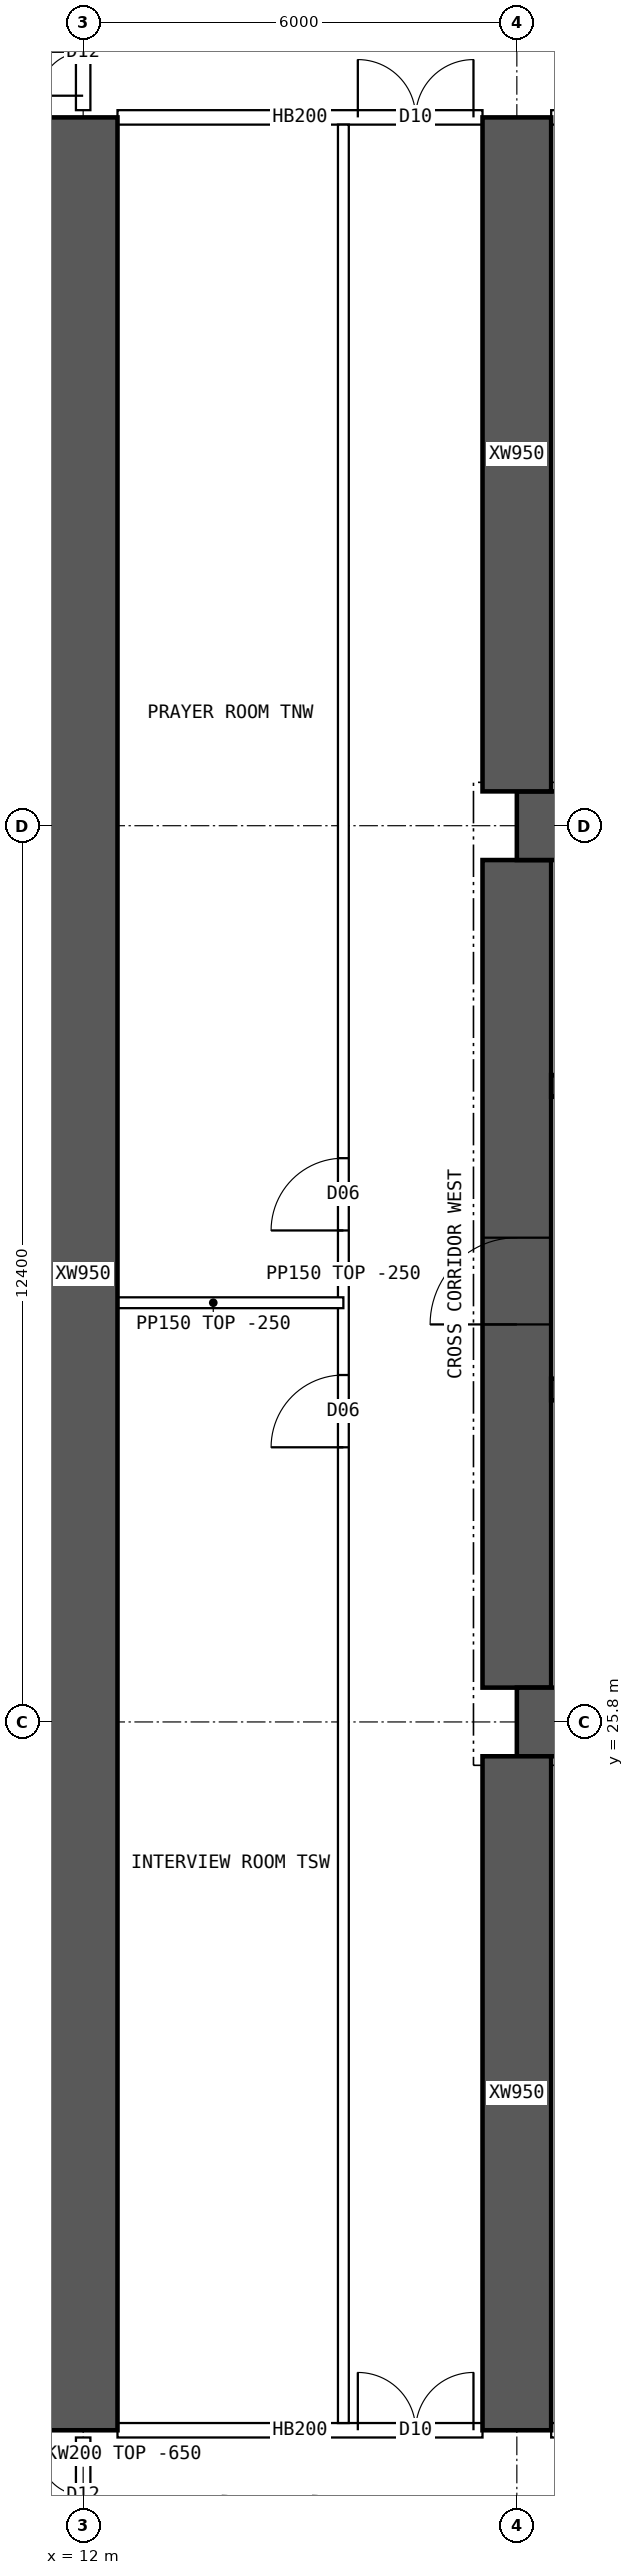
"""IFC4 building model, lengths in metres.
Left out: names, types, materials, properties, quantities, classifications, styles, units other than length and angle.
Written with IfcOpenShell. Run it as: python <this file> out.ifc"""

import sys

from ifc_helpers import new_model, si_unit, direction, frame, frame_2d, origin, place, context, subcontext, project, spatial, polyline, rectangle, outline, extrude, element, fill, save


model = new_model("IFC4")
c1 = context("Model", 3, precision=1e-05, world=origin(), true_north=direction((0.0, 1.0)))
c2 = subcontext(c1, "Body", "Model", "MODEL_VIEW")
j1 = project(units=[si_unit("LENGTHUNIT", "METRE"), si_unit("PLANEANGLEUNIT", "RADIAN")], contexts=[c1])
p1 = place(None, origin())
s1 = spatial("IfcSite", under=j1, at=p1, CompositionType="ELEMENT")
p2 = place(p1, origin())
s2 = spatial("IfcBuilding", under=s1, at=p2, CompositionType="ELEMENT")
p3 = place(p2, frame((0.0, 0.0, 88.15)))
s3 = spatial("IfcBuildingStorey", under=s2, at=p3, CompositionType="ELEMENT", Elevation=88.15)
for number, where, z_axis, x_axis in (
    (1, (18.0, 25.8, 0.0), (0.0, 0.0, 1.0), (1.0, 0.0, 0.0)),
    (2, (18.0, 38.2, 0.0), (0.0, 0.0, 1.0), (1.0, 0.0, 0.0)),
):
    element("IfcWall", number, at=place(p3, frame(where, z_axis=z_axis, x_axis=x_axis)), inside=s3, PredefinedType="SHEAR", context=c2, shape_type="SweptSolid", body=[
        extrude(rectangle(XDim=48.0, YDim=0.95, at=frame_2d((24.0, 0.0))), origin(), (0.0, 0.0, 1.0), 3.75),
    ])
p4 = place(p3, frame((18.0, 26.275, 0.0), z_axis=(0.0, 0.0, 1.0), x_axis=(0.0, 1.0, 0.0)))
e3 = element("IfcWall", 3, at=p4, inside=s3, PredefinedType="SHEAR", context=c2, shape_type="SweptSolid", body=[
    extrude(rectangle(XDim=11.45, YDim=0.95, at=frame_2d((5.725, 0.0))), origin(), (0.0, 0.0, 1.0), 3.75),
])
p5 = place(p4, frame((5.025, 0.0, 0.0)))
e4 = element("IfcOpeningElement", 4, at=p5, cuts=e3, PredefinedType="OPENING", context=c2, shape_type="SweptSolid", body=[
    extrude(rectangle(XDim=1.2, YDim=2.1, at=frame_2d((0.6, 1.05))), frame((0.0, 0.485, 0.0), z_axis=(0.0, -1.0, 0.0), x_axis=(1.0, 0.0, 0.0)), (0.0, 0.0, 1.0), 0.97),
])
p6 = place(p3, frame((18.475, 30.4, 0.0), z_axis=(0.0, 0.0, 1.0), x_axis=(1.0, 0.0, 0.0)))
e5 = element("IfcWall", 5, at=p6, inside=s3, PredefinedType="SHEAR", context=c2, shape_type="SweptSolid", body=[
    extrude(rectangle(XDim=47.05, YDim=0.3, at=frame_2d((23.525, 0.0))), origin(), (0.0, 0.0, 1.0), 3.75),
])
p7 = place(p6, frame((0.4, 0.0, 0.0)))
e6 = element("IfcOpeningElement", 6, at=p7, cuts=e5, PredefinedType="OPENING", context=c2, shape_type="SweptSolid", body=[
    extrude(rectangle(XDim=1.0, YDim=2.1, at=frame_2d((0.5, 1.05))), frame((0.0, 0.16, 0.0), z_axis=(0.0, -1.0, 0.0), x_axis=(1.0, 0.0, 0.0)), (0.0, 0.0, 1.0), 0.32),
])
p8 = place(p6, frame((45.65, 0.0, 0.0)))
e7 = element("IfcOpeningElement", 7, at=p8, cuts=e5, PredefinedType="OPENING", context=c2, shape_type="SweptSolid", body=[
    extrude(rectangle(XDim=1.0, YDim=2.1, at=frame_2d((0.5, 1.05))), frame((0.0, 0.16, 0.0), z_axis=(0.0, -1.0, 0.0), x_axis=(1.0, 0.0, 0.0)), (0.0, 0.0, 1.0), 0.32),
])
p9 = place(p6, frame((8.275, 0.0, 0.0)))
e8 = element("IfcOpeningElement", 8, at=p9, cuts=e5, PredefinedType="OPENING", context=c2, shape_type="SweptSolid", body=[
    extrude(rectangle(XDim=1.1, YDim=2.1, at=frame_2d((0.55, 1.05))), frame((0.0, 0.16, 0.0), z_axis=(0.0, -1.0, 0.0), x_axis=(1.0, 0.0, 0.0)), (0.0, 0.0, 1.0), 0.32),
])
p10 = place(p6, frame((10.875, 0.0, 0.0)))
e9 = element("IfcOpeningElement", 9, at=p10, cuts=e5, PredefinedType="OPENING", context=c2, shape_type="SweptSolid", body=[
    extrude(rectangle(XDim=1.1, YDim=2.1, at=frame_2d((0.55, 1.05))), frame((0.0, 0.16, 0.0), z_axis=(0.0, -1.0, 0.0), x_axis=(1.0, 0.0, 0.0)), (0.0, 0.0, 1.0), 0.32),
])
p11 = place(p6, frame((13.475, 0.0, 0.0)))
e10 = element("IfcOpeningElement", 10, at=p11, cuts=e5, PredefinedType="OPENING", context=c2, shape_type="SweptSolid", body=[
    extrude(rectangle(XDim=1.1, YDim=2.1, at=frame_2d((0.55, 1.05))), frame((0.0, 0.16, 0.0), z_axis=(0.0, -1.0, 0.0), x_axis=(1.0, 0.0, 0.0)), (0.0, 0.0, 1.0), 0.32),
])
p12 = place(p6, frame((16.075, 0.0, 0.0)))
e11 = element("IfcOpeningElement", 11, at=p12, cuts=e5, PredefinedType="OPENING", context=c2, shape_type="SweptSolid", body=[
    extrude(rectangle(XDim=1.1, YDim=2.1, at=frame_2d((0.55, 1.05))), frame((0.0, 0.16, 0.0), z_axis=(0.0, -1.0, 0.0), x_axis=(1.0, 0.0, 0.0)), (0.0, 0.0, 1.0), 0.32),
])
p13 = place(p6, frame((18.85, 0.0, 0.0)))
e12 = element("IfcOpeningElement", 12, at=p13, cuts=e5, PredefinedType="OPENING", context=c2, shape_type="SweptSolid", body=[
    extrude(rectangle(XDim=0.9, YDim=2.1, at=frame_2d((0.45, 1.05))), frame((0.0, 0.16, 0.0), z_axis=(0.0, -1.0, 0.0), x_axis=(1.0, 0.0, 0.0)), (0.0, 0.0, 1.0), 0.32),
])
p14 = place(p6, frame((30.142, 0.0, 0.0)))
e13 = element("IfcOpeningElement", 13, at=p14, cuts=e5, PredefinedType="OPENING", context=c2, shape_type="SweptSolid", body=[
    extrude(rectangle(XDim=1.1, YDim=2.1, at=frame_2d((0.55, 1.05))), frame((0.0, 0.16, 0.0), z_axis=(0.0, -1.0, 0.0), x_axis=(1.0, 0.0, 0.0)), (0.0, 0.0, 1.0), 0.32),
])
p15 = place(p6, frame((33.675, 0.0, 0.0)))
e14 = element("IfcOpeningElement", 14, at=p15, cuts=e5, PredefinedType="OPENING", context=c2, shape_type="SweptSolid", body=[
    extrude(rectangle(XDim=1.1, YDim=2.1, at=frame_2d((0.55, 1.05))), frame((0.0, 0.16, 0.0), z_axis=(0.0, -1.0, 0.0), x_axis=(1.0, 0.0, 0.0)), (0.0, 0.0, 1.0), 0.32),
])
p16 = place(p6, frame((37.208, 0.0, 0.0)))
e15 = element("IfcOpeningElement", 15, at=p16, cuts=e5, PredefinedType="OPENING", context=c2, shape_type="SweptSolid", body=[
    extrude(rectangle(XDim=1.1, YDim=2.1, at=frame_2d((0.55, 1.05))), frame((0.0, 0.16, 0.0), z_axis=(0.0, -1.0, 0.0), x_axis=(1.0, 0.0, 0.0)), (0.0, 0.0, 1.0), 0.32),
])
p17 = place(p3, frame((18.475, 34.6, 0.0), z_axis=(0.0, 0.0, 1.0), x_axis=(1.0, 0.0, 0.0)))
e16 = element("IfcWall", 16, at=p17, inside=s3, PredefinedType="SHEAR", context=c2, shape_type="SweptSolid", body=[
    extrude(rectangle(XDim=47.05, YDim=0.3, at=frame_2d((23.525, 0.0))), origin(), (0.0, 0.0, 1.0), 3.75),
])
p18 = place(p17, frame((0.9, 0.0, 0.0)))
e17 = element("IfcOpeningElement", 17, at=p18, cuts=e16, PredefinedType="OPENING", context=c2, shape_type="SweptSolid", body=[
    extrude(rectangle(XDim=1.1, YDim=2.1, at=frame_2d((0.55, 1.05))), frame((0.0, 0.16, 0.0), z_axis=(0.0, -1.0, 0.0), x_axis=(1.0, 0.0, 0.0)), (0.0, 0.0, 1.0), 0.32),
])
p19 = place(p17, frame((45.05, 0.0, 0.0)))
e18 = element("IfcOpeningElement", 18, at=p19, cuts=e16, PredefinedType="OPENING", context=c2, shape_type="SweptSolid", body=[
    extrude(rectangle(XDim=1.1, YDim=2.1, at=frame_2d((0.55, 1.05))), frame((0.0, 0.16, 0.0), z_axis=(0.0, -1.0, 0.0), x_axis=(1.0, 0.0, 0.0)), (0.0, 0.0, 1.0), 0.32),
])
p20 = place(p17, frame((4.125, 0.0, 0.0)))
e19 = element("IfcOpeningElement", 19, at=p20, cuts=e16, PredefinedType="OPENING", context=c2, shape_type="SweptSolid", body=[
    extrude(rectangle(XDim=0.9, YDim=2.1, at=frame_2d((0.45, 1.05))), frame((0.0, 0.16, 0.0), z_axis=(0.0, -1.0, 0.0), x_axis=(1.0, 0.0, 0.0)), (0.0, 0.0, 1.0), 0.32),
])
p21 = place(p17, frame((42.025, 0.0, 0.0)))
e20 = element("IfcOpeningElement", 20, at=p21, cuts=e16, PredefinedType="OPENING", context=c2, shape_type="SweptSolid", body=[
    extrude(rectangle(XDim=0.9, YDim=2.1, at=frame_2d((0.45, 1.05))), frame((0.0, 0.16, 0.0), z_axis=(0.0, -1.0, 0.0), x_axis=(1.0, 0.0, 0.0)), (0.0, 0.0, 1.0), 0.32),
])
p22 = place(p17, frame((8.9, 0.0, 0.0)))
e21 = element("IfcOpeningElement", 21, at=p22, cuts=e16, PredefinedType="OPENING", context=c2, shape_type="SweptSolid", body=[
    extrude(rectangle(XDim=0.9, YDim=2.1, at=frame_2d((0.45, 1.05))), frame((0.0, 0.16, 0.0), z_axis=(0.0, -1.0, 0.0), x_axis=(1.0, 0.0, 0.0)), (0.0, 0.0, 1.0), 0.32),
])
p23 = place(p17, frame((12.874, 0.0, 0.0)))
e22 = element("IfcOpeningElement", 22, at=p23, cuts=e16, PredefinedType="OPENING", context=c2, shape_type="SweptSolid", body=[
    extrude(rectangle(XDim=0.9, YDim=2.1, at=frame_2d((0.45, 1.05))), frame((0.0, 0.16, 0.0), z_axis=(0.0, -1.0, 0.0), x_axis=(1.0, 0.0, 0.0)), (0.0, 0.0, 1.0), 0.32),
])
p24 = place(p17, frame((16.521, 0.0, 0.0)))
e23 = element("IfcOpeningElement", 23, at=p24, cuts=e16, PredefinedType="OPENING", context=c2, shape_type="SweptSolid", body=[
    extrude(rectangle(XDim=0.9, YDim=2.1, at=frame_2d((0.45, 1.05))), frame((0.0, 0.16, 0.0), z_axis=(0.0, -1.0, 0.0), x_axis=(1.0, 0.0, 0.0)), (0.0, 0.0, 1.0), 0.32),
])
p25 = place(p17, frame((20.28, 0.0, 0.0)))
e24 = element("IfcOpeningElement", 24, at=p25, cuts=e16, PredefinedType="OPENING", context=c2, shape_type="SweptSolid", body=[
    extrude(rectangle(XDim=0.9, YDim=2.1, at=frame_2d((0.45, 1.05))), frame((0.0, 0.16, 0.0), z_axis=(0.0, -1.0, 0.0), x_axis=(1.0, 0.0, 0.0)), (0.0, 0.0, 1.0), 0.32),
])
p26 = place(p17, frame((24.686, 0.0, 0.0)))
e25 = element("IfcOpeningElement", 25, at=p26, cuts=e16, PredefinedType="OPENING", context=c2, shape_type="SweptSolid", body=[
    extrude(rectangle(XDim=0.9, YDim=2.1, at=frame_2d((0.45, 1.05))), frame((0.0, 0.16, 0.0), z_axis=(0.0, -1.0, 0.0), x_axis=(1.0, 0.0, 0.0)), (0.0, 0.0, 1.0), 0.32),
])
p27 = place(p17, frame((27.483, 0.0, 0.0)))
e26 = element("IfcOpeningElement", 26, at=p27, cuts=e16, PredefinedType="OPENING", context=c2, shape_type="SweptSolid", body=[
    extrude(rectangle(XDim=0.9, YDim=2.1, at=frame_2d((0.45, 1.05))), frame((0.0, 0.16, 0.0), z_axis=(0.0, -1.0, 0.0), x_axis=(1.0, 0.0, 0.0)), (0.0, 0.0, 1.0), 0.32),
])
p28 = place(p17, frame((33.604, 0.0, 0.0)))
e27 = element("IfcOpeningElement", 27, at=p28, cuts=e16, PredefinedType="OPENING", context=c2, shape_type="SweptSolid", body=[
    extrude(rectangle(XDim=0.9, YDim=2.1, at=frame_2d((0.45, 1.05))), frame((0.0, 0.16, 0.0), z_axis=(0.0, -1.0, 0.0), x_axis=(1.0, 0.0, 0.0)), (0.0, 0.0, 1.0), 0.32),
])
p29 = place(p3, frame((12.0, 16.0, 0.0), z_axis=(0.0, 0.0, 1.0), x_axis=(0.0, 1.0, 0.0)))
e28 = element("IfcWall", 28, at=p29, inside=s3, PredefinedType="SHEAR", context=c2, shape_type="SweptSolid", body=[
    extrude(rectangle(XDim=32.0, YDim=0.95, at=frame_2d((16.0, 0.0))), origin(), (0.0, 0.0, 1.0), 3.75),
])
for number, where, z_axis, x_axis in (
    (29, (18.0, 16.0, 0.0), (0.0, 0.0, 1.0), (0.0, 1.0, 0.0)),
    (30, (18.0, 38.675, 0.0), (0.0, 0.0, 1.0), (0.0, 1.0, 0.0)),
):
    element("IfcWall", number, at=place(p3, frame(where, z_axis=z_axis, x_axis=x_axis)), inside=s3, PredefinedType="SHEAR", context=c2, shape_type="SweptSolid", body=[
        extrude(rectangle(XDim=9.325, YDim=0.95, at=frame_2d((4.663, 0.0))), origin(), (0.0, 0.0, 1.0), 3.75),
    ])
p30 = place(p3, frame((12.475, 16.0, 0.0), z_axis=(0.0, 0.0, 1.0), x_axis=(1.0, 0.0, 0.0)))
e31 = element("IfcWall", 31, at=p30, inside=s3, PredefinedType="SOLIDWALL", context=c2, shape_type="SweptSolid", body=[
    extrude(rectangle(XDim=5.05, YDim=0.2, at=frame_2d((2.525, 0.0))), origin(), (0.0, 0.0, 1.0), 3.5),
])
p31 = place(p30, frame((3.325, 0.0, 0.0)))
e32 = element("IfcOpeningElement", 32, at=p31, cuts=e31, PredefinedType="OPENING", context=c2, shape_type="SweptSolid", body=[
    extrude(rectangle(XDim=1.6, YDim=2.1, at=frame_2d((0.8, 1.05))), frame((0.0, 0.11, 0.0), z_axis=(0.0, -1.0, 0.0), x_axis=(1.0, 0.0, 0.0)), (0.0, 0.0, 1.0), 0.22),
])
p32 = place(p3, frame((18.475, 16.0, 0.0), z_axis=(0.0, 0.0, 1.0), x_axis=(1.0, 0.0, 0.0)))
e33 = element("IfcWall", 33, at=p32, inside=s3, PredefinedType="SOLIDWALL", context=c2, shape_type="SweptSolid", body=[
    extrude(rectangle(XDim=5.05, YDim=0.2, at=frame_2d((2.525, 0.0))), origin(), (0.0, 0.0, 1.0), 3.5),
])
p33 = place(p32, frame((0.35, 0.0, 0.0)))
e34 = element("IfcOpeningElement", 34, at=p33, cuts=e33, PredefinedType="OPENING", context=c2, shape_type="SweptSolid", body=[
    extrude(rectangle(XDim=0.9, YDim=2.1, at=frame_2d((0.45, 1.05))), frame((0.0, 0.11, 0.0), z_axis=(0.0, -1.0, 0.0), x_axis=(1.0, 0.0, 0.0)), (0.0, 0.0, 1.0), 0.22),
])
p34 = place(p32, frame((3.215, 0.0, 0.0)))
e35 = element("IfcOpeningElement", 35, at=p34, cuts=e33, PredefinedType="OPENING", context=c2, shape_type="SweptSolid", body=[
    extrude(rectangle(XDim=0.9, YDim=2.1, at=frame_2d((0.45, 1.05))), frame((0.0, 0.11, 0.0), z_axis=(0.0, -1.0, 0.0), x_axis=(1.0, 0.0, 0.0)), (0.0, 0.0, 1.0), 0.22),
])
p35 = place(p3, frame((12.475, 48.0, 0.0), z_axis=(0.0, 0.0, 1.0), x_axis=(1.0, 0.0, 0.0)))
e36 = element("IfcWall", 36, at=p35, inside=s3, PredefinedType="SOLIDWALL", context=c2, shape_type="SweptSolid", body=[
    extrude(rectangle(XDim=5.05, YDim=0.2, at=frame_2d((2.525, 0.0))), origin(), (0.0, 0.0, 1.0), 3.5),
])
p36 = place(p35, frame((3.325, 0.0, 0.0)))
e37 = element("IfcOpeningElement", 37, at=p36, cuts=e36, PredefinedType="OPENING", context=c2, shape_type="SweptSolid", body=[
    extrude(rectangle(XDim=1.6, YDim=2.1, at=frame_2d((0.8, 1.05))), frame((0.0, 0.11, 0.0), z_axis=(0.0, -1.0, 0.0), x_axis=(1.0, 0.0, 0.0)), (0.0, 0.0, 1.0), 0.22),
])
p37 = place(p3, frame((18.475, 48.0, 0.0), z_axis=(0.0, 0.0, 1.0), x_axis=(1.0, 0.0, 0.0)))
e38 = element("IfcWall", 38, at=p37, inside=s3, PredefinedType="SOLIDWALL", context=c2, shape_type="SweptSolid", body=[
    extrude(rectangle(XDim=5.05, YDim=0.2, at=frame_2d((2.525, 0.0))), origin(), (0.0, 0.0, 1.0), 3.5),
])
p38 = place(p37, frame((0.8, 0.0, 0.0)))
e39 = element("IfcOpeningElement", 39, at=p38, cuts=e38, PredefinedType="OPENING", context=c2, shape_type="SweptSolid", body=[
    extrude(rectangle(XDim=1.0, YDim=2.1, at=frame_2d((0.5, 1.05))), frame((0.0, 0.11, 0.0), z_axis=(0.0, -1.0, 0.0), x_axis=(1.0, 0.0, 0.0)), (0.0, 0.0, 1.0), 0.22),
])
p39 = place(p3, frame((15.6, 16.1, 0.0), z_axis=(0.0, 0.0, 1.0), x_axis=(0.0, 1.0, 0.0)))
e40 = element("IfcWall", 40, at=p39, inside=s3, PredefinedType="PARTITIONING", context=c2, shape_type="SweptSolid", body=[
    extrude(rectangle(XDim=31.8, YDim=0.15, at=frame_2d((15.9, 0.0))), origin(), (0.0, 0.0, 1.0), 3.5),
])
p40 = place(p39, frame((13.5, 0.0, 0.0)))
e41 = element("IfcOpeningElement", 41, at=p40, cuts=e40, PredefinedType="OPENING", context=c2, shape_type="SweptSolid", body=[
    extrude(rectangle(XDim=1.0, YDim=2.1, at=frame_2d((0.5, 1.05))), frame((0.0, 0.085, 0.0), z_axis=(0.0, -1.0, 0.0), x_axis=(1.0, 0.0, 0.0)), (0.0, 0.0, 1.0), 0.17),
])
p41 = place(p39, frame((16.5, 0.0, 0.0)))
e42 = element("IfcOpeningElement", 42, at=p41, cuts=e40, PredefinedType="OPENING", context=c2, shape_type="SweptSolid", body=[
    extrude(rectangle(XDim=1.0, YDim=2.1, at=frame_2d((0.5, 1.05))), frame((0.0, 0.085, 0.0), z_axis=(0.0, -1.0, 0.0), x_axis=(1.0, 0.0, 0.0)), (0.0, 0.0, 1.0), 0.17),
])
p42 = place(p3, frame((12.0, 31.6, 0.0), z_axis=(0.0, 0.0, 1.0), x_axis=(1.0, 0.0, 0.0)))
e43 = element("IfcWall", 43, at=p42, inside=s3, PredefinedType="PARTITIONING", context=c2, shape_type="SweptSolid", body=[
    extrude(rectangle(XDim=3.6, YDim=0.15, at=frame_2d((1.8, 0.0))), origin(), (0.0, 0.0, 1.0), 3.5),
])
p43 = place(p3, frame((3.905, 30.85, 0.0), z_axis=(0.0, 0.0, 1.0), x_axis=(1.0, 0.0, 0.0)))
e44 = element("IfcWall", 44, at=p43, inside=s3, PredefinedType="PARTITIONING", context=c2, shape_type="SweptSolid", body=[
    extrude(outline(polyline([(0.0, 0.0), (8.02, 0.0), (8.02, 3.5), (2.397, 3.5), (2.395, 3.05), (1.797, 3.05), (1.795, 3.5), (0.0, 3.5), (0.0, 0.0)])), frame((0.0, 0.075, 0.0), z_axis=(0.0, -1.0, 0.0), x_axis=(1.0, 0.0, 0.0)), (0.0, 0.0, 1.0), 0.15),
])
p44 = place(p3, frame((12.0, 14.3, 0.0), z_axis=(0.0, 0.0, 1.0), x_axis=(0.0, 1.0, 0.0)))
e45 = element("IfcWall", 45, at=p44, inside=s3, PredefinedType="SOLIDWALL", context=c2, shape_type="SweptSolid", body=[
    extrude(outline(polyline([(0.0, 0.0), (1.6, 0.0), (1.6, 3.1), (0.0, 3.1), (0.0, 0.0)])), frame((0.0, 0.1, 0.0), z_axis=(0.0, -1.0, 0.0), x_axis=(1.0, 0.0, 0.0)), (0.0, 0.0, 1.0), 0.2),
])
p45 = place(p44, frame((0.2, 0.0, 0.0)))
e46 = element("IfcOpeningElement", 46, at=p45, cuts=e45, PredefinedType="OPENING", context=c2, shape_type="SweptSolid", body=[
    extrude(rectangle(XDim=1.2, YDim=2.1, at=frame_2d((0.6, 1.05))), frame((0.0, 0.11, 0.0), z_axis=(0.0, -1.0, 0.0), x_axis=(1.0, 0.0, 0.0)), (0.0, 0.0, 1.0), 0.22),
])
p46 = place(p3, frame((12.0, 48.1, 0.0), z_axis=(0.0, 0.0, 1.0), x_axis=(0.0, 1.0, 0.0)))
e47 = element("IfcWall", 47, at=p46, inside=s3, PredefinedType="SOLIDWALL", context=c2, shape_type="SweptSolid", body=[
    extrude(outline(polyline([(0.0, 0.0), (1.6, 0.0), (1.6, 3.1), (0.0, 3.1), (0.0, 0.0)])), frame((0.0, 0.1, 0.0), z_axis=(0.0, -1.0, 0.0), x_axis=(1.0, 0.0, 0.0)), (0.0, 0.0, 1.0), 0.2),
])
p47 = place(p46, frame((0.2, 0.0, 0.0)))
e48 = element("IfcOpeningElement", 48, at=p47, cuts=e47, PredefinedType="OPENING", context=c2, shape_type="SweptSolid", body=[
    extrude(rectangle(XDim=1.2, YDim=2.1, at=frame_2d((0.6, 1.05))), frame((0.0, 0.11, 0.0), z_axis=(0.0, -1.0, 0.0), x_axis=(1.0, 0.0, 0.0)), (0.0, 0.0, 1.0), 0.22),
])
p48 = place(p5, origin())
e49 = element("IfcDoor", 49, at=p48, inside=s3, OperationType="SINGLE_SWING_LEFT", PredefinedType="DOOR", context=c2, shape_type="SweptSolid", body=[
    extrude(rectangle(XDim=1.2, YDim=2.1, at=frame_2d((0.6, 1.05))), frame((0.0, 0.025, 0.0), z_axis=(0.0, -1.0, 0.0), x_axis=(1.0, 0.0, 0.0)), (0.0, 0.0, 1.0), 0.05),
])
fill(e4, e49)
p49 = place(p31, origin())
e50 = element("IfcDoor", 50, at=p49, inside=s3, OperationType="DOUBLE_DOOR_SINGLE_SWING", PredefinedType="DOOR", context=c2, shape_type="SweptSolid", body=[
    extrude(rectangle(XDim=1.6, YDim=2.1, at=frame_2d((0.8, 1.05))), frame((0.0, 0.025, 0.0), z_axis=(0.0, -1.0, 0.0), x_axis=(1.0, 0.0, 0.0)), (0.0, 0.0, 1.0), 0.05),
])
fill(e32, e50)
p50 = place(p36, origin())
e51 = element("IfcDoor", 51, at=p50, inside=s3, OperationType="DOUBLE_DOOR_SINGLE_SWING", PredefinedType="DOOR", context=c2, shape_type="SweptSolid", body=[
    extrude(rectangle(XDim=1.6, YDim=2.1, at=frame_2d((0.8, 1.05))), frame((0.0, 0.025, 0.0), z_axis=(0.0, -1.0, 0.0), x_axis=(1.0, 0.0, 0.0)), (0.0, 0.0, 1.0), 0.05),
])
fill(e37, e51)
p51 = place(p40, origin())
e52 = element("IfcDoor", 52, at=p51, inside=s3, OperationType="SINGLE_SWING_LEFT", PredefinedType="DOOR", context=c2, shape_type="SweptSolid", body=[
    extrude(rectangle(XDim=1.0, YDim=2.1, at=frame_2d((0.5, 1.05))), frame((0.0, 0.025, 0.0), z_axis=(0.0, -1.0, 0.0), x_axis=(1.0, 0.0, 0.0)), (0.0, 0.0, 1.0), 0.05),
])
fill(e41, e52)
p52 = place(p41, origin())
e53 = element("IfcDoor", 53, at=p52, inside=s3, OperationType="SINGLE_SWING_LEFT", PredefinedType="DOOR", context=c2, shape_type="SweptSolid", body=[
    extrude(rectangle(XDim=1.0, YDim=2.1, at=frame_2d((0.5, 1.05))), frame((0.0, 0.025, 0.0), z_axis=(0.0, -1.0, 0.0), x_axis=(1.0, 0.0, 0.0)), (0.0, 0.0, 1.0), 0.05),
])
fill(e42, e53)
p53 = place(p45, origin())
e54 = element("IfcDoor", 54, at=p53, inside=s3, OperationType="DOUBLE_DOOR_SINGLE_SWING", PredefinedType="DOOR", context=c2, shape_type="SweptSolid", body=[
    extrude(rectangle(XDim=1.2, YDim=2.1, at=frame_2d((0.6, 1.05))), frame((0.0, 0.025, 0.0), z_axis=(0.0, -1.0, 0.0), x_axis=(1.0, 0.0, 0.0)), (0.0, 0.0, 1.0), 0.05),
])
fill(e46, e54)
p54 = place(p47, origin())
e55 = element("IfcDoor", 55, at=p54, inside=s3, OperationType="DOUBLE_DOOR_SINGLE_SWING", PredefinedType="DOOR", context=c2, shape_type="SweptSolid", body=[
    extrude(rectangle(XDim=1.2, YDim=2.1, at=frame_2d((0.6, 1.05))), frame((0.0, 0.025, 0.0), z_axis=(0.0, -1.0, 0.0), x_axis=(1.0, 0.0, 0.0)), (0.0, 0.0, 1.0), 0.05),
])
fill(e48, e55)
save(model, sys.argv[1])
